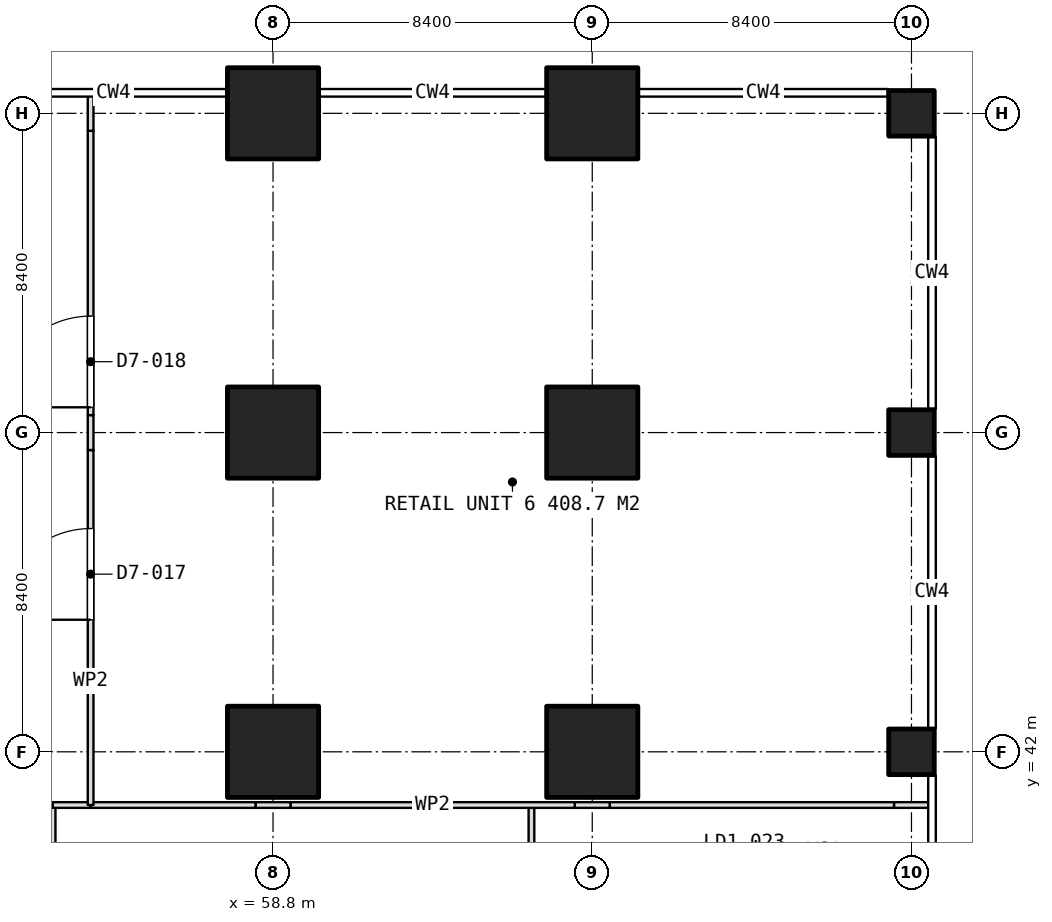
"""IFC4 building model, lengths in metres.
Left out: names, types, materials, properties, quantities, classifications, styles, units other than length and angle.
Written with IfcOpenShell. Run it as: python <this file> out.ifc"""

import sys

from ifc_helpers import new_model, si_unit, direction, frame, frame_2d, origin, origin_2d, place, context, subcontext, project, spatial, rectangle, extrude, element, fill, save


model = new_model("IFC4")
c1 = context("Model", 3, precision=1e-05, world=origin(), true_north=direction((0.0, 1.0)))
c2 = subcontext(c1, "Body", "Model", "MODEL_VIEW")
j1 = project(units=[si_unit("LENGTHUNIT", "METRE"), si_unit("PLANEANGLEUNIT", "RADIAN")], contexts=[c1])
p1 = place(None, origin())
s1 = spatial("IfcSite", under=j1, at=p1, CompositionType="ELEMENT")
p2 = place(p1, origin())
s2 = spatial("IfcBuilding", under=s1, at=p2, CompositionType="ELEMENT")
p3 = place(p2, frame((0.0, 0.0, 5.4)))
s3 = spatial("IfcBuildingStorey", under=s2, at=p3, CompositionType="ELEMENT", Elevation=5.4)
for number, where, z_axis, x_axis in (
    (1, (58.8, 42.0, 0.0), (0.0, 0.0, 1.0), (1.0, 0.0, 0.0)),
    (2, (58.8, 50.4, 0.0), (0.0, 0.0, 1.0), (1.0, 0.0, 0.0)),
    (3, (58.8, 58.8, 0.0), (0.0, 0.0, 1.0), (1.0, 0.0, 0.0)),
    (4, (67.2, 42.0, 0.0), (0.0, 0.0, 1.0), (1.0, 0.0, 0.0)),
    (5, (67.2, 50.4, 0.0), (0.0, 0.0, 1.0), (1.0, 0.0, 0.0)),
    (6, (67.2, 58.8, 0.0), (0.0, 0.0, 1.0), (1.0, 0.0, 0.0)),
):
    element("IfcColumn", number, at=place(p3, frame(where, z_axis=z_axis, x_axis=x_axis)), inside=s3, PredefinedType="COLUMN", context=c2, shape_type="SweptSolid", body=[
        extrude(rectangle(XDim=2.4, YDim=2.4, at=origin_2d()), origin(), (0.0, 0.0, 1.0), 5.0),
    ])
for number, where, z_axis, x_axis in (
    (7, (75.6, 42.0, 0.0), (0.0, 0.0, 1.0), (1.0, 0.0, 0.0)),
    (8, (75.6, 50.4, 0.0), (0.0, 0.0, 1.0), (1.0, 0.0, 0.0)),
    (9, (75.6, 58.8, 0.0), (0.0, 0.0, 1.0), (1.0, 0.0, 0.0)),
):
    element("IfcColumn", number, at=place(p3, frame(where, z_axis=z_axis, x_axis=x_axis)), inside=s3, PredefinedType="COLUMN", context=c2, shape_type="SweptSolid", body=[
        extrude(rectangle(XDim=1.2, YDim=1.2, at=origin_2d()), origin(), (0.0, 0.0, 1.0), 5.0),
    ])
p4 = place(p3, frame((76.09, 40.6, 0.0), z_axis=(0.0, 0.0, 1.0), x_axis=(-1.0, 0.0, 0.0)))
e10 = element("IfcWall", 10, at=p4, inside=s3, PredefinedType="PARTITIONING", context=c2, shape_type="SweptSolid", body=[
    extrude(rectangle(XDim=0.95, YDim=0.15, at=frame_2d((0.475, 0.0))), origin(), (0.0, 0.0, 1.0), 2.9),
])
p5 = place(p3, frame((75.14, 40.6, 0.0), z_axis=(0.0, 0.0, 1.0), x_axis=(-1.0, 0.0, 0.0)))
e11 = element("IfcWall", 11, at=p5, inside=s3, PredefinedType="PARTITIONING", context=c2, shape_type="SweptSolid", body=[
    extrude(rectangle(XDim=7.48, YDim=0.15, at=frame_2d((3.74, 0.0))), origin(), (0.0, 0.0, 1.0), 4.7),
])
p6 = place(p3, frame((67.66, 40.6, 0.0), z_axis=(0.0, 0.0, 1.0), x_axis=(-1.0, 0.0, 0.0)))
e12 = element("IfcWall", 12, at=p6, inside=s3, PredefinedType="PARTITIONING", context=c2, shape_type="SweptSolid", body=[
    extrude(rectangle(XDim=0.92, YDim=0.15, at=frame_2d((0.46, 0.0))), origin(), (0.0, 0.0, 1.0), 2.9),
])
p7 = place(p3, frame((66.74, 40.6, 0.0), z_axis=(0.0, 0.0, 1.0), x_axis=(-1.0, 0.0, 0.0)))
e13 = element("IfcWall", 13, at=p7, inside=s3, PredefinedType="PARTITIONING", context=c2, shape_type="SweptSolid", body=[
    extrude(rectangle(XDim=7.48, YDim=0.15, at=frame_2d((3.74, 0.0))), origin(), (0.0, 0.0, 1.0), 4.7),
])
p8 = place(p3, frame((59.26, 40.6, 0.0), z_axis=(0.0, 0.0, 1.0), x_axis=(-1.0, 0.0, 0.0)))
e14 = element("IfcWall", 14, at=p8, inside=s3, PredefinedType="PARTITIONING", context=c2, shape_type="SweptSolid", body=[
    extrude(rectangle(XDim=0.92, YDim=0.15, at=frame_2d((0.46, 0.0))), origin(), (0.0, 0.0, 1.0), 2.9),
])
p9 = place(p3, frame((58.34, 40.6, 0.0), z_axis=(0.0, 0.0, 1.0), x_axis=(-1.0, 0.0, 0.0)))
e15 = element("IfcWall", 15, at=p9, inside=s3, PredefinedType="PARTITIONING", context=c2, shape_type="SweptSolid", body=[
    extrude(rectangle(XDim=4.34, YDim=0.15, at=frame_2d((2.17, 0.0))), origin(), (0.0, 0.0, 1.0), 4.7),
])
p10 = place(p3, frame((54.0, 40.6, 0.0), z_axis=(0.0, 0.0, 1.0), x_axis=(0.0, 1.0, 0.0)))
e16 = element("IfcWall", 16, at=p10, inside=s3, PredefinedType="PARTITIONING", context=c2, shape_type="SweptSolid", body=[
    extrude(rectangle(XDim=9.34, YDim=0.15, at=frame_2d((4.67, 0.0))), origin(), (0.0, 0.0, 1.0), 4.7),
])
p11 = place(p10, frame((4.875, 0.0, 0.0)))
e17 = element("IfcOpeningElement", 17, at=p11, cuts=e16, PredefinedType="OPENING", context=c2, shape_type="SweptSolid", body=[
    extrude(rectangle(XDim=2.4, YDim=2.4, at=frame_2d((1.2, 1.2))), frame((0.0, 0.085, 0.0), z_axis=(0.0, -1.0, 0.0), x_axis=(1.0, 0.0, 0.0)), (0.0, 0.0, 1.0), 0.17),
])
p12 = place(p3, frame((54.0, 49.94, 0.0), z_axis=(0.0, 0.0, 1.0), x_axis=(0.0, 1.0, 0.0)))
e18 = element("IfcWall", 18, at=p12, inside=s3, PredefinedType="PARTITIONING", context=c2, shape_type="SweptSolid", body=[
    extrude(rectangle(XDim=0.92, YDim=0.15, at=frame_2d((0.46, 0.0))), origin(), (0.0, 0.0, 1.0), 2.9),
])
p13 = place(p3, frame((54.0, 50.86, 0.0), z_axis=(0.0, 0.0, 1.0), x_axis=(0.0, 1.0, 0.0)))
e19 = element("IfcWall", 19, at=p13, inside=s3, PredefinedType="PARTITIONING", context=c2, shape_type="SweptSolid", body=[
    extrude(rectangle(XDim=7.48, YDim=0.15, at=frame_2d((3.74, 0.0))), origin(), (0.0, 0.0, 1.0), 4.7),
])
p14 = place(p13, frame((0.205, 0.0, 0.0)))
e20 = element("IfcOpeningElement", 20, at=p14, cuts=e19, PredefinedType="OPENING", context=c2, shape_type="SweptSolid", body=[
    extrude(rectangle(XDim=2.4, YDim=2.4, at=frame_2d((1.2, 1.2))), frame((0.0, 0.085, 0.0), z_axis=(0.0, -1.0, 0.0), x_axis=(1.0, 0.0, 0.0)), (0.0, 0.0, 1.0), 0.17),
])
p15 = place(p3, frame((54.0, 58.34, 0.0), z_axis=(0.0, 0.0, 1.0), x_axis=(0.0, 1.0, 0.0)))
e21 = element("IfcWall", 21, at=p15, inside=s3, PredefinedType="PARTITIONING", context=c2, shape_type="SweptSolid", body=[
    extrude(rectangle(XDim=0.95, YDim=0.15, at=frame_2d((0.475, 0.0))), origin(), (0.0, 0.0, 1.0), 2.9),
])
p16 = place(p3, frame((53.0, 30.8, 0.0), z_axis=(0.0, 0.0, 1.0), x_axis=(0.0, 1.0, 0.0)))
e22 = element("IfcWall", 22, at=p16, inside=s3, PredefinedType="PARTITIONING", context=c2, shape_type="SweptSolid", body=[
    extrude(rectangle(XDim=9.8, YDim=0.15, at=frame_2d((4.9, 0.0))), origin(), (0.0, 0.0, 1.0), 4.7),
])
p17 = place(p16, frame((3.7, 0.0, 0.0)))
e23 = element("IfcOpeningElement", 23, at=p17, cuts=e22, PredefinedType="OPENING", context=c2, shape_type="SweptSolid", body=[
    extrude(rectangle(XDim=2.4, YDim=2.4, at=frame_2d((1.2, 1.2))), frame((0.0, 0.085, 0.0), z_axis=(0.0, -1.0, 0.0), x_axis=(1.0, 0.0, 0.0)), (0.0, 0.0, 1.0), 0.17),
])
p18 = place(p3, frame((53.0, 40.6, 0.0), z_axis=(0.0, 0.0, 1.0), x_axis=(1.0, 0.0, 0.0)))
e24 = element("IfcWall", 24, at=p18, inside=s3, PredefinedType="PARTITIONING", context=c2, shape_type="SweptSolid", body=[
    extrude(rectangle(XDim=1.0, YDim=0.15, at=frame_2d((0.5, 0.0))), origin(), (0.0, 0.0, 1.0), 4.7),
])
p19 = place(p3, frame((65.6, 40.525, 0.0), z_axis=(0.0, 0.0, 1.0), x_axis=(0.0, -1.0, 0.0)))
e25 = element("IfcWall", 25, at=p19, inside=s3, PredefinedType="PARTITIONING", context=c2, shape_type="SweptSolid", body=[
    extrude(rectangle(XDim=6.465, YDim=0.15, at=frame_2d((3.232, 0.0))), origin(), (0.0, 0.0, 1.0), 4.7),
])
p20 = place(p11, origin())
e26 = element("IfcDoor", 26, at=p20, inside=s3, OperationType="DOUBLE_DOOR_SINGLE_SWING", PredefinedType="DOOR", context=c2, shape_type="SweptSolid", body=[
    extrude(rectangle(XDim=2.4, YDim=2.4, at=frame_2d((1.2, 1.2))), frame((0.0, 0.025, 0.0), z_axis=(0.0, -1.0, 0.0), x_axis=(1.0, 0.0, 0.0)), (0.0, 0.0, 1.0), 0.05),
])
fill(e17, e26)
p21 = place(p14, origin())
e27 = element("IfcDoor", 27, at=p21, inside=s3, OperationType="DOUBLE_DOOR_SINGLE_SWING", PredefinedType="DOOR", context=c2, shape_type="SweptSolid", body=[
    extrude(rectangle(XDim=2.4, YDim=2.4, at=frame_2d((1.2, 1.2))), frame((0.0, 0.025, 0.0), z_axis=(0.0, -1.0, 0.0), x_axis=(1.0, 0.0, 0.0)), (0.0, 0.0, 1.0), 0.05),
])
fill(e20, e27)
save(model, sys.argv[1])
